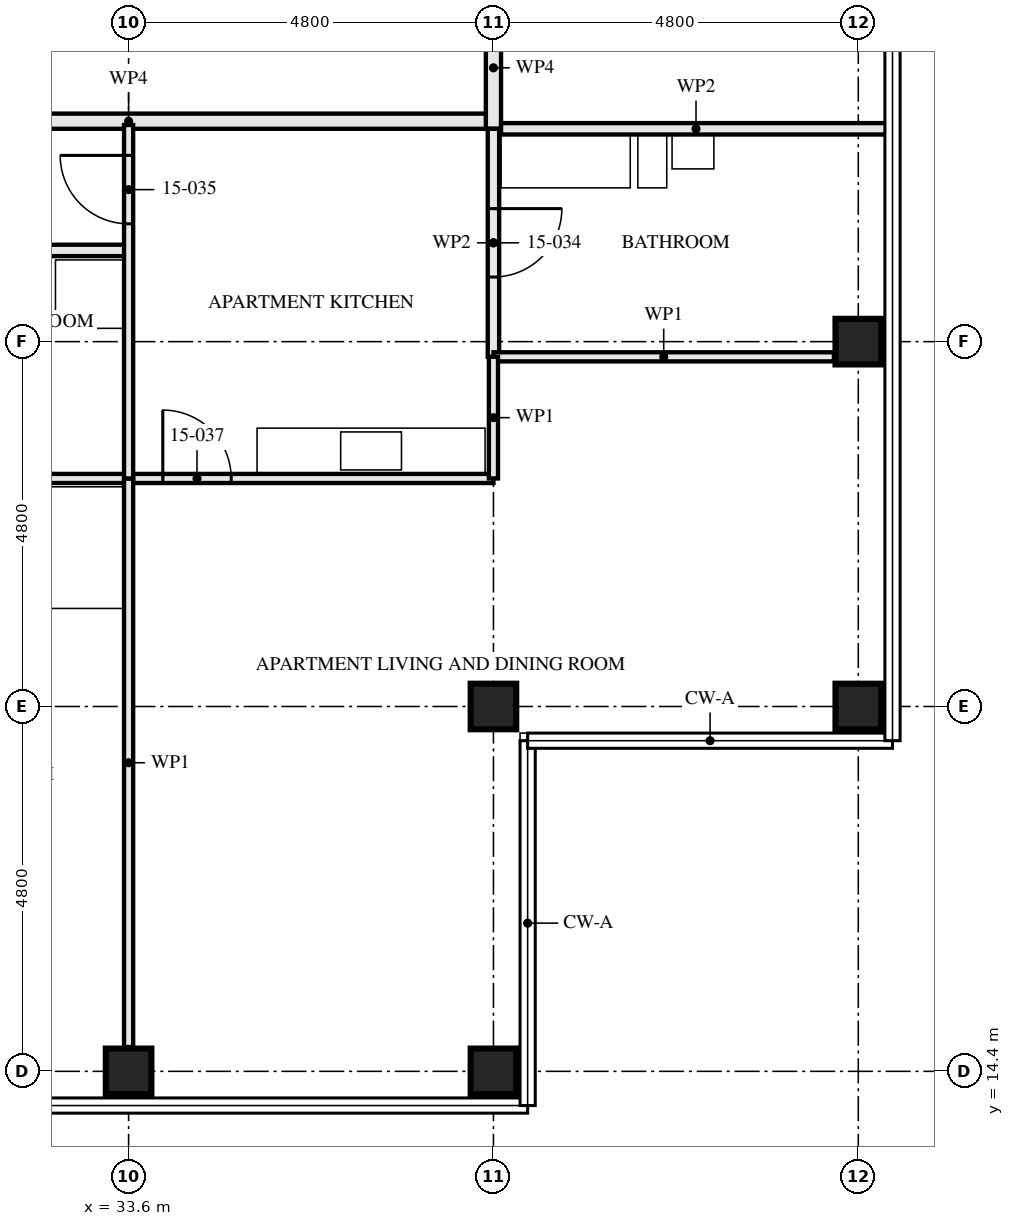
"""IFC4 building model, lengths in metres.
Left out: names, types, materials, properties, quantities, classifications, styles, units other than length and angle.
Written with IfcOpenShell. Run it as: python <this file> out.ifc"""

import sys

from ifc_helpers import new_model, si_unit, direction, frame, frame_2d, origin, origin_2d, place, context, subcontext, project, spatial, rectangle, hollow_rectangle, extrude, element, fill, save


model = new_model("IFC4")
c1 = context("Model", 3, precision=1e-05, world=origin(), true_north=direction((0.0, 1.0)))
c2 = subcontext(c1, "Body", "Model", "MODEL_VIEW")
j1 = project(units=[si_unit("LENGTHUNIT", "METRE"), si_unit("PLANEANGLEUNIT", "RADIAN")], contexts=[c1])
p1 = place(None, origin())
s1 = spatial("IfcSite", under=j1, at=p1, CompositionType="ELEMENT")
p2 = place(p1, origin())
s2 = spatial("IfcBuilding", under=s1, at=p2, CompositionType="ELEMENT")
p3 = place(p2, frame((0.0, 0.0, 58.5)))
s3 = spatial("IfcBuildingStorey", under=s2, at=p3, CompositionType="ELEMENT", Elevation=58.5)
p4 = place(p3, frame((33.6, 14.4, 0.0), z_axis=(0.0, 0.0, 1.0), x_axis=(0.0, 1.0, 0.0)))
e1 = element("IfcColumn", 1, at=p4, inside=s3, PredefinedType="COLUMN", context=c2, shape_type="SweptSolid", body=[
    extrude(hollow_rectangle(XDim=0.6, YDim=0.6, WallThickness=0.08, at=origin_2d()), origin(), (0.0, 0.0, 1.0), 3.5),
])
for number, where, z_axis, x_axis in (
    (2, (38.4, 14.4, 0.0), (0.0, 0.0, 1.0), (0.0, 1.0, 0.0)),
    (3, (38.4, 19.2, 0.0), (0.0, 0.0, 1.0), (0.0, 1.0, 0.0)),
    (4, (43.2, 19.2, 0.0), (0.0, 0.0, 1.0), (0.0, 1.0, 0.0)),
):
    element("IfcColumn", number, at=place(p3, frame(where, z_axis=z_axis, x_axis=x_axis)), inside=s3, PredefinedType="COLUMN", context=c2, shape_type="SweptSolid", body=[
        extrude(hollow_rectangle(XDim=0.6, YDim=0.6, WallThickness=0.06, at=origin_2d()), origin(), (0.0, 0.0, 1.0), 3.5),
    ])
p5 = place(p3, frame((43.2, 24.0, 0.0), z_axis=(0.0, 0.0, 1.0), x_axis=(1.0, 0.0, 0.0)))
e5 = element("IfcColumn", 5, at=p5, inside=s3, PredefinedType="COLUMN", context=c2, shape_type="SweptSolid", body=[
    extrude(hollow_rectangle(XDim=0.6, YDim=0.6, WallThickness=0.08, at=origin_2d()), origin(), (0.0, 0.0, 1.0), 3.5),
])
p6 = place(p3, frame((30.8, 25.2, 0.0), z_axis=(0.0, 0.0, 1.0), x_axis=(1.0, 0.0, 0.0)))
e6 = element("IfcWall", 6, at=p6, inside=s3, PredefinedType="PARTITIONING", context=c2, shape_type="SweptSolid", body=[
    extrude(rectangle(XDim=2.8, YDim=0.15, at=frame_2d((1.4, 0.0))), origin(), (0.0, 0.0, 1.0), 3.33),
])
p7 = place(p3, frame((38.4, 23.8, 0.0), z_axis=(0.0, 0.0, 1.0), x_axis=(0.0, 1.0, 0.0)))
e7 = element("IfcWall", 7, at=p7, inside=s3, PredefinedType="PARTITIONING", context=c2, shape_type="SweptSolid", body=[
    extrude(rectangle(XDim=3.0, YDim=0.15, at=frame_2d((1.5, 0.0))), origin(), (0.0, 0.0, 1.0), 2.55),
])
p8 = place(p7, frame((1.05, 0.0, 0.0)))
e8 = element("IfcOpeningElement", 8, at=p8, cuts=e7, PredefinedType="OPENING", context=c2, shape_type="SweptSolid", body=[
    extrude(rectangle(XDim=0.9, YDim=2.1, at=frame_2d((0.45, 1.05))), frame((0.0, 0.085, 0.0), z_axis=(0.0, -1.0, 0.0), x_axis=(1.0, 0.0, 0.0)), (0.0, 0.0, 1.0), 0.171),
])
p9 = place(p3, frame((33.6, 22.2, 0.0), z_axis=(0.0, 0.0, 1.0), x_axis=(0.0, 1.0, 0.0)))
e9 = element("IfcWall", 9, at=p9, inside=s3, PredefinedType="PARTITIONING", context=c2, shape_type="SweptSolid", body=[
    extrude(rectangle(XDim=4.65, YDim=0.12, at=frame_2d((2.325, 0.0))), origin(), (0.0, 0.0, 1.0), 2.55),
])
p10 = place(p9, frame((3.35, 0.0, 0.0)))
e10 = element("IfcOpeningElement", 10, at=p10, cuts=e9, PredefinedType="OPENING", context=c2, shape_type="SweptSolid", body=[
    extrude(rectangle(XDim=0.9, YDim=2.1, at=frame_2d((0.45, 1.05))), frame((0.0, 0.071, 0.0), z_axis=(0.0, -1.0, 0.0), x_axis=(1.0, 0.0, 0.0)), (0.0, 0.0, 1.0), 0.141),
])
p11 = place(p3, frame((28.8, 22.2, 0.0), z_axis=(0.0, 0.0, 1.0), x_axis=(1.0, 0.0, 0.0)))
e11 = element("IfcWall", 11, at=p11, inside=s3, PredefinedType="PARTITIONING", context=c2, shape_type="SweptSolid", body=[
    extrude(rectangle(XDim=4.8, YDim=0.12, at=frame_2d((2.4, 0.0))), origin(), (0.0, 0.0, 1.0), 3.33),
])
p12 = place(p11, frame((0.45, 0.0, 0.0)))
e12 = element("IfcOpeningElement", 12, at=p12, cuts=e11, PredefinedType="OPENING", context=c2, shape_type="SweptSolid", body=[
    extrude(rectangle(XDim=0.9, YDim=2.1, at=frame_2d((0.45, 1.05))), frame((0.0, 0.071, 0.0), z_axis=(0.0, -1.0, 0.0), x_axis=(1.0, 0.0, 0.0)), (0.0, 0.0, 1.0), 0.141),
])
p13 = place(p3, frame((33.6, 22.2, 0.0), z_axis=(0.0, 0.0, 1.0), x_axis=(1.0, 0.0, 0.0)))
e13 = element("IfcWall", 13, at=p13, inside=s3, PredefinedType="PARTITIONING", context=c2, shape_type="SweptSolid", body=[
    extrude(rectangle(XDim=4.8, YDim=0.12, at=frame_2d((2.4, 0.0))), origin(), (0.0, 0.0, 1.0), 3.33),
])
p14 = place(p13, frame((0.45, 0.0, 0.0)))
e14 = element("IfcOpeningElement", 14, at=p14, cuts=e13, PredefinedType="OPENING", context=c2, shape_type="SweptSolid", body=[
    extrude(rectangle(XDim=0.9, YDim=2.1, at=frame_2d((0.45, 1.05))), frame((0.0, 0.071, 0.0), z_axis=(0.0, -1.0, 0.0), x_axis=(1.0, 0.0, 0.0)), (0.0, 0.0, 1.0), 0.141),
])
p15 = place(p3, frame((38.4, 23.8, 0.0), z_axis=(0.0, 0.0, 1.0), x_axis=(1.0, 0.0, 0.0)))
e15 = element("IfcWall", 15, at=p15, inside=s3, PredefinedType="PARTITIONING", context=c2, shape_type="SweptSolid", body=[
    extrude(rectangle(XDim=4.48, YDim=0.12, at=frame_2d((2.24, 0.0))), origin(), (0.0, 0.0, 1.0), 3.33),
])
p16 = place(p3, frame((33.6, 14.72, 0.0), z_axis=(0.0, 0.0, 1.0), x_axis=(0.0, 1.0, 0.0)))
e16 = element("IfcWall", 16, at=p16, inside=s3, PredefinedType="PARTITIONING", context=c2, shape_type="SweptSolid", body=[
    extrude(rectangle(XDim=7.48, YDim=0.12, at=frame_2d((3.74, 0.0))), origin(), (0.0, 0.0, 1.0), 2.55),
])
p17 = place(p3, frame((38.4, 22.2, 0.0), z_axis=(0.0, 0.0, 1.0), x_axis=(0.0, 1.0, 0.0)))
e17 = element("IfcWall", 17, at=p17, inside=s3, PredefinedType="PARTITIONING", context=c2, shape_type="SweptSolid", body=[
    extrude(rectangle(XDim=1.6, YDim=0.12, at=frame_2d((0.8, 0.0))), origin(), (0.0, 0.0, 1.0), 3.33),
])
p18 = place(p3, frame((28.8, 26.9, 0.0), z_axis=(0.0, 0.0, 1.0), x_axis=(1.0, 0.0, 0.0)))
e18 = element("IfcWall", 18, at=p18, inside=s3, PredefinedType="PARTITIONING", context=c2, shape_type="SweptSolid", body=[
    extrude(rectangle(XDim=9.6, YDim=0.2, at=frame_2d((4.8, 0.0))), origin(), (0.0, 0.0, 1.0), 3.33),
])
p19 = place(p18, frame((0.4, 0.0, 0.0)))
e19 = element("IfcOpeningElement", 19, at=p19, cuts=e18, PredefinedType="OPENING", context=c2, shape_type="SweptSolid", body=[
    extrude(rectangle(XDim=1.0, YDim=2.1, at=frame_2d((0.5, 1.05))), frame((0.0, 0.111, 0.0), z_axis=(0.0, -1.0, 0.0), x_axis=(1.0, 0.0, 0.0)), (0.0, 0.0, 1.0), 0.221),
])
p20 = place(p3, frame((38.4, 26.8, 0.0), z_axis=(0.0, 0.0, 1.0), x_axis=(0.0, 1.0, 0.0)))
e20 = element("IfcWall", 20, at=p20, inside=s3, PredefinedType="PARTITIONING", context=c2, shape_type="SweptSolid", body=[
    extrude(rectangle(XDim=1.605, YDim=0.2, at=frame_2d((0.802, 0.0))), origin(), (0.0, 0.0, 1.0), 3.33),
])
p21 = place(p3, frame((38.5, 26.8, 0.0), z_axis=(0.0, 0.0, 1.0), x_axis=(1.0, 0.0, 0.0)))
e21 = element("IfcWall", 21, at=p21, inside=s3, PredefinedType="PARTITIONING", context=c2, shape_type="SweptSolid", body=[
    extrude(rectangle(XDim=5.13, YDim=0.15, at=frame_2d((2.565, 0.0))), origin(), (0.0, 0.0, 1.0), 2.32),
])
p22 = place(p8, frame((0.9, 0.0, 0.0), z_axis=(0.0, 0.0, 1.0), x_axis=(-1.0, 0.0, 0.0)))
e22 = element("IfcDoor", 22, at=p22, inside=s3, OperationType="SINGLE_SWING_RIGHT", PredefinedType="DOOR", context=c2, shape_type="SweptSolid", body=[
    extrude(rectangle(XDim=0.9, YDim=2.1, at=frame_2d((0.45, 1.05))), frame((0.0, 0.022, 0.0), z_axis=(0.0, -1.0, 0.0), x_axis=(1.0, 0.0, 0.0)), (0.0, 0.0, 1.0), 0.044),
])
fill(e8, e22)
p23 = place(p10, origin())
e23 = element("IfcDoor", 23, at=p23, inside=s3, OperationType="SINGLE_SWING_LEFT", PredefinedType="DOOR", context=c2, shape_type="SweptSolid", body=[
    extrude(rectangle(XDim=0.9, YDim=2.1, at=frame_2d((0.45, 1.05))), frame((0.0, 0.022, 0.0), z_axis=(0.0, -1.0, 0.0), x_axis=(1.0, 0.0, 0.0)), (0.0, 0.0, 1.0), 0.044),
])
fill(e10, e23)
p24 = place(p14, origin())
e24 = element("IfcDoor", 24, at=p24, inside=s3, OperationType="SINGLE_SWING_RIGHT", PredefinedType="DOOR", context=c2, shape_type="SweptSolid", body=[
    extrude(rectangle(XDim=0.9, YDim=2.1, at=frame_2d((0.45, 1.05))), frame((0.0, 0.022, 0.0), z_axis=(0.0, -1.0, 0.0), x_axis=(1.0, 0.0, 0.0)), (0.0, 0.0, 1.0), 0.044),
])
fill(e14, e24)
save(model, sys.argv[1])
